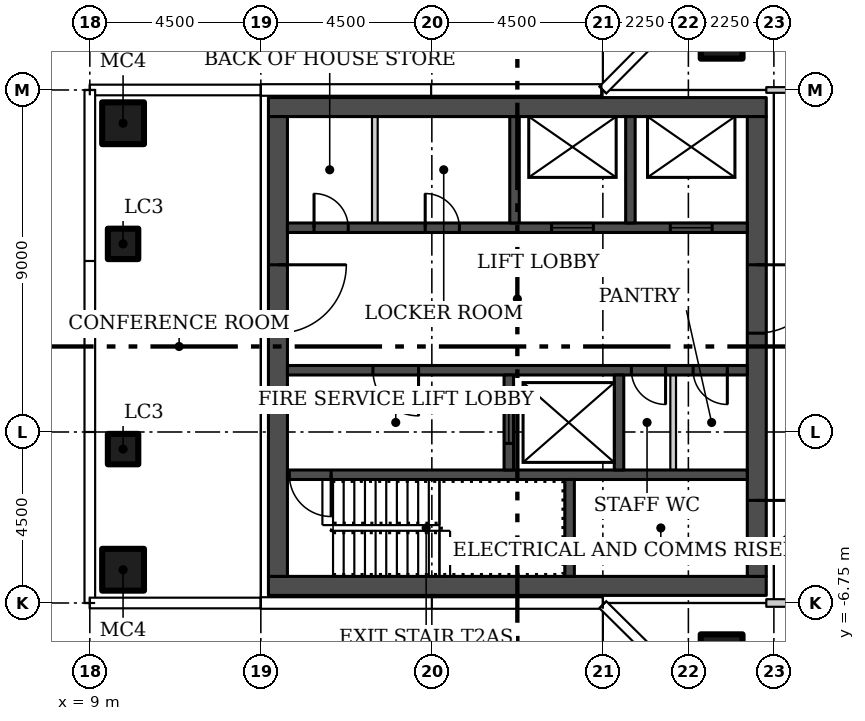
"""IFC4 building model, lengths in metres.
Left out: names, types, materials, properties, quantities, classifications, styles, units other than length and angle.
Written with IfcOpenShell. Run it as: python <this file> out.ifc"""

import sys

from ifc_helpers import new_model, si_unit, direction, frame, frame_2d, origin, origin_2d, place, context, subcontext, project, spatial, rectangle, hollow_rectangle, extrude, element, fill, save


model = new_model("IFC4")
c1 = context("Model", 3, precision=1e-05, world=origin(), true_north=direction((0.0, 1.0)))
c2 = subcontext(c1, "Body", "Model", "MODEL_VIEW")
j1 = project(units=[si_unit("LENGTHUNIT", "METRE"), si_unit("PLANEANGLEUNIT", "RADIAN")], contexts=[c1])
p1 = place(None, origin())
s1 = spatial("IfcSite", under=j1, at=p1, CompositionType="ELEMENT")
p2 = place(p1, origin())
s2 = spatial("IfcBuilding", under=s1, at=p2, CompositionType="ELEMENT")
p3 = place(p2, frame((0.0, 0.0, 146.7)))
s3 = spatial("IfcBuildingStorey", under=s2, at=p3, CompositionType="ELEMENT", Elevation=146.7)
for number, where in (
    (1, (25.625, 8.125, 0.0)),
    (2, (25.625, -8.125, 0.0)),
    (3, (9.875, -5.875, 0.0)),
    (4, (9.875, 5.875, 0.0)),
):
    element("IfcColumn", number, at=place(p3, frame(where)), inside=s3, PredefinedType="COLUMN", context=c2, shape_type="SweptSolid", body=[
        extrude(hollow_rectangle(XDim=1.1, YDim=1.1, WallThickness=0.04, at=origin_2d()), origin(), (0.0, 0.0, 1.0), 3.55),
    ])
for number, where in (
    (5, (9.875, -2.7, 0.0)),
    (6, (9.875, 2.7, 0.0)),
):
    element("IfcColumn", number, at=place(p3, frame(where)), inside=s3, PredefinedType="COLUMN", context=c2, shape_type="SweptSolid", body=[
        extrude(hollow_rectangle(XDim=0.8, YDim=0.8, WallThickness=0.03, at=origin_2d()), origin(), (0.0, 0.0, 1.0), 3.55),
    ])
p4 = place(p3, frame((26.8, 6.75, 0.0)))
e7 = element("IfcWall", 7, at=p4, inside=s3, PredefinedType="PARTITIONING", context=c2, shape_type="SweptSolid", body=[
    extrude(rectangle(XDim=4.775, YDim=0.15, at=frame_2d((2.387, 0.0))), origin(), (0.0, 0.0, 1.0), 3.55),
])
p5 = place(p4, frame((1.95, 0.0, 0.0)))
e8 = element("IfcOpeningElement", 8, at=p5, cuts=e7, PredefinedType="OPENING", context=c2, shape_type="SweptSolid", body=[
    extrude(rectangle(XDim=1.0, YDim=2.4, at=frame_2d((0.5, 1.2))), frame((0.0, 0.085, 0.0), z_axis=(0.0, -1.0, 0.0), x_axis=(1.0, 0.0, 0.0)), (0.0, 0.0, 1.0), 0.17),
])
p6 = place(p3, frame((26.8, -6.75, 0.0)))
e9 = element("IfcWall", 9, at=p6, inside=s3, PredefinedType="PARTITIONING", context=c2, shape_type="SweptSolid", body=[
    extrude(rectangle(XDim=9.3, YDim=0.2, at=frame_2d((4.65, 0.0))), origin(), (0.0, 0.0, 1.0), 3.55),
])
p7 = place(p6, frame((6.65, 0.0, 0.0)))
e10 = element("IfcOpeningElement", 10, at=p7, cuts=e9, PredefinedType="OPENING", context=c2, shape_type="SweptSolid", body=[
    extrude(rectangle(XDim=1.5, YDim=2.4, at=frame_2d((0.75, 1.2))), frame((0.0, 0.11, 0.0), z_axis=(0.0, -1.0, 0.0), x_axis=(1.0, 0.0, 0.0)), (0.0, 0.0, 1.0), 0.22),
])
p8 = place(p6, frame((1.25, 0.0, 0.0)))
e11 = element("IfcOpeningElement", 11, at=p8, cuts=e9, PredefinedType="OPENING", context=c2, shape_type="SweptSolid", body=[
    extrude(rectangle(XDim=1.5, YDim=2.4, at=frame_2d((0.75, 1.2))), frame((0.0, 0.11, 0.0), z_axis=(0.0, -1.0, 0.0), x_axis=(1.0, 0.0, 0.0)), (0.0, 0.0, 1.0), 0.22),
])
for number, where in (
    (12, (13.7, -6.3, 0.0)),
    (13, (13.7, 6.3, 0.0)),
):
    element("IfcWall", number, at=place(p3, frame(where)), inside=s3, PredefinedType="SHEAR", context=c2, shape_type="SweptSolid", body=[
        extrude(rectangle(XDim=13.1, YDim=0.5, at=frame_2d((6.55, 0.0))), origin(), (0.0, 0.0, 1.0), 3.55),
    ])
p9 = place(p3, frame((13.95, 6.05, 0.0), z_axis=(0.0, 0.0, 1.0), x_axis=(0.0, -1.0, 0.0)))
e14 = element("IfcWall", 14, at=p9, inside=s3, PredefinedType="SHEAR", context=c2, shape_type="SweptSolid", body=[
    extrude(rectangle(XDim=12.1, YDim=0.5, at=frame_2d((6.05, 0.0))), origin(), (0.0, 0.0, 1.0), 3.55),
])
p10 = place(p9, frame((3.9, 0.0, 0.0)))
e15 = element("IfcOpeningElement", 15, at=p10, cuts=e14, PredefinedType="OPENING", context=c2, shape_type="SweptSolid", body=[
    extrude(rectangle(XDim=1.8, YDim=2.4, at=frame_2d((0.9, 1.2))), frame((0.0, 0.26, 0.0), z_axis=(0.0, -1.0, 0.0), x_axis=(1.0, 0.0, 0.0)), (0.0, 0.0, 1.0), 0.52),
])
p11 = place(p3, frame((26.55, 6.05, 0.0), z_axis=(0.0, 0.0, 1.0), x_axis=(0.0, -1.0, 0.0)))
e16 = element("IfcWall", 16, at=p11, inside=s3, PredefinedType="SHEAR", context=c2, shape_type="SweptSolid", body=[
    extrude(rectangle(XDim=12.1, YDim=0.5, at=frame_2d((6.05, 0.0))), origin(), (0.0, 0.0, 1.0), 3.55),
])
p12 = place(p11, frame((10.1, 0.0, 0.0)))
e17 = element("IfcOpeningElement", 17, at=p12, cuts=e16, PredefinedType="OPENING", context=c2, shape_type="SweptSolid", body=[
    extrude(rectangle(XDim=1.2, YDim=2.1, at=frame_2d((0.6, 1.05))), frame((0.0, 0.26, 0.0), z_axis=(0.0, -1.0, 0.0), x_axis=(1.0, 0.0, 0.0)), (0.0, 0.0, 1.0), 0.52),
])
p13 = place(p11, frame((3.9, 0.0, 0.0)))
e18 = element("IfcOpeningElement", 18, at=p13, cuts=e16, PredefinedType="OPENING", context=c2, shape_type="SweptSolid", body=[
    extrude(rectangle(XDim=1.8, YDim=2.4, at=frame_2d((0.9, 1.2))), frame((0.0, 0.26, 0.0), z_axis=(0.0, -1.0, 0.0), x_axis=(1.0, 0.0, 0.0)), (0.0, 0.0, 1.0), 0.52),
])
p14 = place(p3, frame((26.3, -3.375, 0.0), z_axis=(0.0, 0.0, 1.0), x_axis=(-1.0, 0.0, 0.0)))
e19 = element("IfcWall", 19, at=p14, inside=s3, PredefinedType="SHEAR", context=c2, shape_type="SweptSolid", body=[
    extrude(rectangle(XDim=12.1, YDim=0.25, at=frame_2d((6.05, 0.0))), origin(), (0.0, 0.0, 1.0), 3.55),
])
p15 = place(p14, frame((10.95, 0.0, 0.0)))
e20 = element("IfcOpeningElement", 20, at=p15, cuts=e19, PredefinedType="OPENING", context=c2, shape_type="SweptSolid", body=[
    extrude(rectangle(XDim=1.1, YDim=2.1, at=frame_2d((0.55, 1.05))), frame((0.0, 0.135, 0.0), z_axis=(0.0, -1.0, 0.0), x_axis=(1.0, 0.0, 0.0)), (0.0, 0.0, 1.0), 0.27),
])
p16 = place(p3, frame((21.625, -6.05, 0.0), z_axis=(0.0, 0.0, 1.0), x_axis=(0.0, 1.0, 0.0)))
e21 = element("IfcWall", 21, at=p16, inside=s3, PredefinedType="SHEAR", context=c2, shape_type="SweptSolid", body=[
    extrude(rectangle(XDim=2.55, YDim=0.25, at=frame_2d((1.275, 0.0))), origin(), (0.0, 0.0, 1.0), 3.55),
])
p17 = place(p3, frame((26.3, -0.625, 0.0), z_axis=(0.0, 0.0, 1.0), x_axis=(-1.0, 0.0, 0.0)))
e22 = element("IfcWall", 22, at=p17, inside=s3, PredefinedType="SHEAR", context=c2, shape_type="SweptSolid", body=[
    extrude(rectangle(XDim=12.1, YDim=0.25, at=frame_2d((6.05, 0.0))), origin(), (0.0, 0.0, 1.0), 3.55),
])
p18 = place(p17, frame((8.65, 0.0, 0.0)))
e23 = element("IfcOpeningElement", 23, at=p18, cuts=e22, PredefinedType="OPENING", context=c2, shape_type="SweptSolid", body=[
    extrude(rectangle(XDim=1.2, YDim=2.1, at=frame_2d((0.6, 1.05))), frame((0.0, 0.135, 0.0), z_axis=(0.0, -1.0, 0.0), x_axis=(1.0, 0.0, 0.0)), (0.0, 0.0, 1.0), 0.27),
])
p19 = place(p17, frame((2.15, 0.0, 0.0)))
e24 = element("IfcOpeningElement", 24, at=p19, cuts=e22, PredefinedType="OPENING", context=c2, shape_type="SweptSolid", body=[
    extrude(rectangle(XDim=0.9, YDim=2.1, at=frame_2d((0.45, 1.05))), frame((0.0, 0.135, 0.0), z_axis=(0.0, -1.0, 0.0), x_axis=(1.0, 0.0, 0.0)), (0.0, 0.0, 1.0), 0.27),
])
p20 = place(p17, frame((0.525, 0.0, 0.0)))
e25 = element("IfcOpeningElement", 25, at=p20, cuts=e22, PredefinedType="OPENING", context=c2, shape_type="SweptSolid", body=[
    extrude(rectangle(XDim=0.9, YDim=2.1, at=frame_2d((0.45, 1.05))), frame((0.0, 0.135, 0.0), z_axis=(0.0, -1.0, 0.0), x_axis=(1.0, 0.0, 0.0)), (0.0, 0.0, 1.0), 0.27),
])
p21 = place(p3, frame((20.025, -3.25, 0.0), z_axis=(0.0, 0.0, 1.0), x_axis=(0.0, 1.0, 0.0)))
e26 = element("IfcWall", 26, at=p21, inside=s3, PredefinedType="SHEAR", context=c2, shape_type="SweptSolid", body=[
    extrude(rectangle(XDim=2.5, YDim=0.25, at=frame_2d((1.25, 0.0))), origin(), (0.0, 0.0, 1.0), 3.55),
])
p22 = place(p21, frame((0.7, 0.0, 0.0)))
e27 = element("IfcOpeningElement", 27, at=p22, cuts=e26, PredefinedType="OPENING", context=c2, shape_type="SweptSolid", body=[
    extrude(rectangle(XDim=1.1, YDim=2.1, at=frame_2d((0.55, 1.05))), frame((0.0, 0.135, 0.0), z_axis=(0.0, -1.0, 0.0), x_axis=(1.0, 0.0, 0.0)), (0.0, 0.0, 1.0), 0.27),
])
p23 = place(p3, frame((22.925, -3.25, 0.0), z_axis=(0.0, 0.0, 1.0), x_axis=(0.0, 1.0, 0.0)))
e28 = element("IfcWall", 28, at=p23, inside=s3, PredefinedType="SHEAR", context=c2, shape_type="SweptSolid", body=[
    extrude(rectangle(XDim=2.5, YDim=0.25, at=frame_2d((1.25, 0.0))), origin(), (0.0, 0.0, 1.0), 3.55),
])
p24 = place(p3, frame((24.35, -3.25, 0.0), z_axis=(0.0, 0.0, 1.0), x_axis=(0.0, 1.0, 0.0)))
e29 = element("IfcWall", 29, at=p24, inside=s3, PredefinedType="PARTITIONING", context=c2, shape_type="SweptSolid", body=[
    extrude(rectangle(XDim=2.5, YDim=0.15, at=frame_2d((1.25, 0.0))), origin(), (0.0, 0.0, 1.0), 3.55),
])
p25 = place(p3, frame((14.2, 3.125, 0.0)))
e30 = element("IfcWall", 30, at=p25, inside=s3, PredefinedType="SHEAR", context=c2, shape_type="SweptSolid", body=[
    extrude(rectangle(XDim=12.1, YDim=0.25, at=frame_2d((6.05, 0.0))), origin(), (0.0, 0.0, 1.0), 3.55),
])
p26 = place(p25, frame((6.95, 0.0, 0.0)))
e31 = element("IfcOpeningElement", 31, at=p26, cuts=e30, PredefinedType="OPENING", context=c2, shape_type="SweptSolid", body=[
    extrude(rectangle(XDim=1.1, YDim=2.1, at=frame_2d((0.55, 1.05))), frame((0.0, 0.135, 0.0), z_axis=(0.0, -1.0, 0.0), x_axis=(1.0, 0.0, 0.0)), (0.0, 0.0, 1.0), 0.27),
])
p27 = place(p25, frame((10.075, 0.0, 0.0)))
e32 = element("IfcOpeningElement", 32, at=p27, cuts=e30, PredefinedType="OPENING", context=c2, shape_type="SweptSolid", body=[
    extrude(rectangle(XDim=1.1, YDim=2.1, at=frame_2d((0.55, 1.05))), frame((0.0, 0.135, 0.0), z_axis=(0.0, -1.0, 0.0), x_axis=(1.0, 0.0, 0.0)), (0.0, 0.0, 1.0), 0.27),
])
p28 = place(p25, frame((0.7, 0.0, 0.0)))
e33 = element("IfcOpeningElement", 33, at=p28, cuts=e30, PredefinedType="OPENING", context=c2, shape_type="SweptSolid", body=[
    extrude(rectangle(XDim=0.9, YDim=2.1, at=frame_2d((0.45, 1.05))), frame((0.0, 0.135, 0.0), z_axis=(0.0, -1.0, 0.0), x_axis=(1.0, 0.0, 0.0)), (0.0, 0.0, 1.0), 0.27),
])
p29 = place(p25, frame((3.625, 0.0, 0.0)))
e34 = element("IfcOpeningElement", 34, at=p29, cuts=e30, PredefinedType="OPENING", context=c2, shape_type="SweptSolid", body=[
    extrude(rectangle(XDim=0.9, YDim=2.1, at=frame_2d((0.45, 1.05))), frame((0.0, 0.135, 0.0), z_axis=(0.0, -1.0, 0.0), x_axis=(1.0, 0.0, 0.0)), (0.0, 0.0, 1.0), 0.27),
])
for number, where, z_axis, x_axis in (
    (35, (20.175, 3.25, 0.0), (0.0, 0.0, 1.0), (0.0, 1.0, 0.0)),
    (36, (23.225, 3.25, 0.0), (0.0, 0.0, 1.0), (0.0, 1.0, 0.0)),
):
    element("IfcWall", number, at=place(p3, frame(where, z_axis=z_axis, x_axis=x_axis)), inside=s3, PredefinedType="SHEAR", context=c2, shape_type="SweptSolid", body=[
        extrude(rectangle(XDim=2.8, YDim=0.25, at=frame_2d((1.4, 0.0))), origin(), (0.0, 0.0, 1.0), 3.55),
    ])
p30 = place(p3, frame((16.5, 3.25, 0.0), z_axis=(0.0, 0.0, 1.0), x_axis=(0.0, 1.0, 0.0)))
e37 = element("IfcWall", 37, at=p30, inside=s3, PredefinedType="PARTITIONING", context=c2, shape_type="SweptSolid", body=[
    extrude(rectangle(XDim=2.8, YDim=0.15, at=frame_2d((1.4, 0.0))), origin(), (0.0, 0.0, 1.0), 3.55),
])
p31 = place(p10, origin())
e38 = element("IfcDoor", 38, at=p31, inside=s3, OperationType="DOUBLE_DOOR_SINGLE_SWING", PredefinedType="DOOR", context=c2, shape_type="SweptSolid", body=[
    extrude(rectangle(XDim=1.8, YDim=2.4, at=frame_2d((0.9, 1.2))), frame((0.0, 0.025, 0.0), z_axis=(0.0, -1.0, 0.0), x_axis=(1.0, 0.0, 0.0)), (0.0, 0.0, 1.0), 0.05),
])
fill(e15, e38)
p32 = place(p12, origin())
e39 = element("IfcDoor", 39, at=p32, inside=s3, OperationType="SINGLE_SWING_RIGHT", PredefinedType="DOOR", context=c2, shape_type="SweptSolid", body=[
    extrude(rectangle(XDim=1.2, YDim=2.1, at=frame_2d((0.6, 1.05))), frame((0.0, 0.025, 0.0), z_axis=(0.0, -1.0, 0.0), x_axis=(1.0, 0.0, 0.0)), (0.0, 0.0, 1.0), 0.05),
])
fill(e17, e39)
p33 = place(p13, origin())
e40 = element("IfcDoor", 40, at=p33, inside=s3, OperationType="DOUBLE_DOOR_SINGLE_SWING", PredefinedType="DOOR", context=c2, shape_type="SweptSolid", body=[
    extrude(rectangle(XDim=1.8, YDim=2.4, at=frame_2d((0.9, 1.2))), frame((0.0, 0.025, 0.0), z_axis=(0.0, -1.0, 0.0), x_axis=(1.0, 0.0, 0.0)), (0.0, 0.0, 1.0), 0.05),
])
fill(e18, e40)
p34 = place(p15, origin())
e41 = element("IfcDoor", 41, at=p34, inside=s3, OperationType="SINGLE_SWING_RIGHT", PredefinedType="DOOR", context=c2, shape_type="SweptSolid", body=[
    extrude(rectangle(XDim=1.1, YDim=2.1, at=frame_2d((0.55, 1.05))), frame((0.0, 0.025, 0.0), z_axis=(0.0, -1.0, 0.0), x_axis=(1.0, 0.0, 0.0)), (0.0, 0.0, 1.0), 0.05),
])
fill(e20, e41)
p35 = place(p18, origin())
e42 = element("IfcDoor", 42, at=p35, inside=s3, OperationType="SINGLE_SWING_RIGHT", PredefinedType="DOOR", context=c2, shape_type="SweptSolid", body=[
    extrude(rectangle(XDim=1.2, YDim=2.1, at=frame_2d((0.6, 1.05))), frame((0.0, 0.025, 0.0), z_axis=(0.0, -1.0, 0.0), x_axis=(1.0, 0.0, 0.0)), (0.0, 0.0, 1.0), 0.05),
])
fill(e23, e42)
p36 = place(p19, origin())
e43 = element("IfcDoor", 43, at=p36, inside=s3, OperationType="SINGLE_SWING_LEFT", PredefinedType="DOOR", context=c2, shape_type="SweptSolid", body=[
    extrude(rectangle(XDim=0.9, YDim=2.1, at=frame_2d((0.45, 1.05))), frame((0.0, 0.025, 0.0), z_axis=(0.0, -1.0, 0.0), x_axis=(1.0, 0.0, 0.0)), (0.0, 0.0, 1.0), 0.05),
])
fill(e24, e43)
p37 = place(p20, origin())
e44 = element("IfcDoor", 44, at=p37, inside=s3, OperationType="SINGLE_SWING_LEFT", PredefinedType="DOOR", context=c2, shape_type="SweptSolid", body=[
    extrude(rectangle(XDim=0.9, YDim=2.1, at=frame_2d((0.45, 1.05))), frame((0.0, 0.025, 0.0), z_axis=(0.0, -1.0, 0.0), x_axis=(1.0, 0.0, 0.0)), (0.0, 0.0, 1.0), 0.05),
])
fill(e25, e44)
p38 = place(p22, origin())
e45 = element("IfcDoor", 45, at=p38, inside=s3, OperationType="SLIDING_TO_LEFT", PredefinedType="DOOR", context=c2, shape_type="SweptSolid", body=[
    extrude(rectangle(XDim=1.1, YDim=2.1, at=frame_2d((0.55, 1.05))), frame((0.0, 0.025, 0.0), z_axis=(0.0, -1.0, 0.0), x_axis=(1.0, 0.0, 0.0)), (0.0, 0.0, 1.0), 0.05),
])
fill(e27, e45)
p39 = place(p26, origin())
e46 = element("IfcDoor", 46, at=p39, inside=s3, OperationType="SLIDING_TO_LEFT", PredefinedType="DOOR", context=c2, shape_type="SweptSolid", body=[
    extrude(rectangle(XDim=1.1, YDim=2.1, at=frame_2d((0.55, 1.05))), frame((0.0, 0.025, 0.0), z_axis=(0.0, -1.0, 0.0), x_axis=(1.0, 0.0, 0.0)), (0.0, 0.0, 1.0), 0.05),
])
fill(e31, e46)
p40 = place(p27, origin())
e47 = element("IfcDoor", 47, at=p40, inside=s3, OperationType="SLIDING_TO_LEFT", PredefinedType="DOOR", context=c2, shape_type="SweptSolid", body=[
    extrude(rectangle(XDim=1.1, YDim=2.1, at=frame_2d((0.55, 1.05))), frame((0.0, 0.025, 0.0), z_axis=(0.0, -1.0, 0.0), x_axis=(1.0, 0.0, 0.0)), (0.0, 0.0, 1.0), 0.05),
])
fill(e32, e47)
p41 = place(p28, origin())
e48 = element("IfcDoor", 48, at=p41, inside=s3, OperationType="SINGLE_SWING_LEFT", PredefinedType="DOOR", context=c2, shape_type="SweptSolid", body=[
    extrude(rectangle(XDim=0.9, YDim=2.1, at=frame_2d((0.45, 1.05))), frame((0.0, 0.025, 0.0), z_axis=(0.0, -1.0, 0.0), x_axis=(1.0, 0.0, 0.0)), (0.0, 0.0, 1.0), 0.05),
])
fill(e33, e48)
p42 = place(p29, origin())
e49 = element("IfcDoor", 49, at=p42, inside=s3, OperationType="SINGLE_SWING_LEFT", PredefinedType="DOOR", context=c2, shape_type="SweptSolid", body=[
    extrude(rectangle(XDim=0.9, YDim=2.1, at=frame_2d((0.45, 1.05))), frame((0.0, 0.025, 0.0), z_axis=(0.0, -1.0, 0.0), x_axis=(1.0, 0.0, 0.0)), (0.0, 0.0, 1.0), 0.05),
])
fill(e34, e49)
save(model, sys.argv[1])
